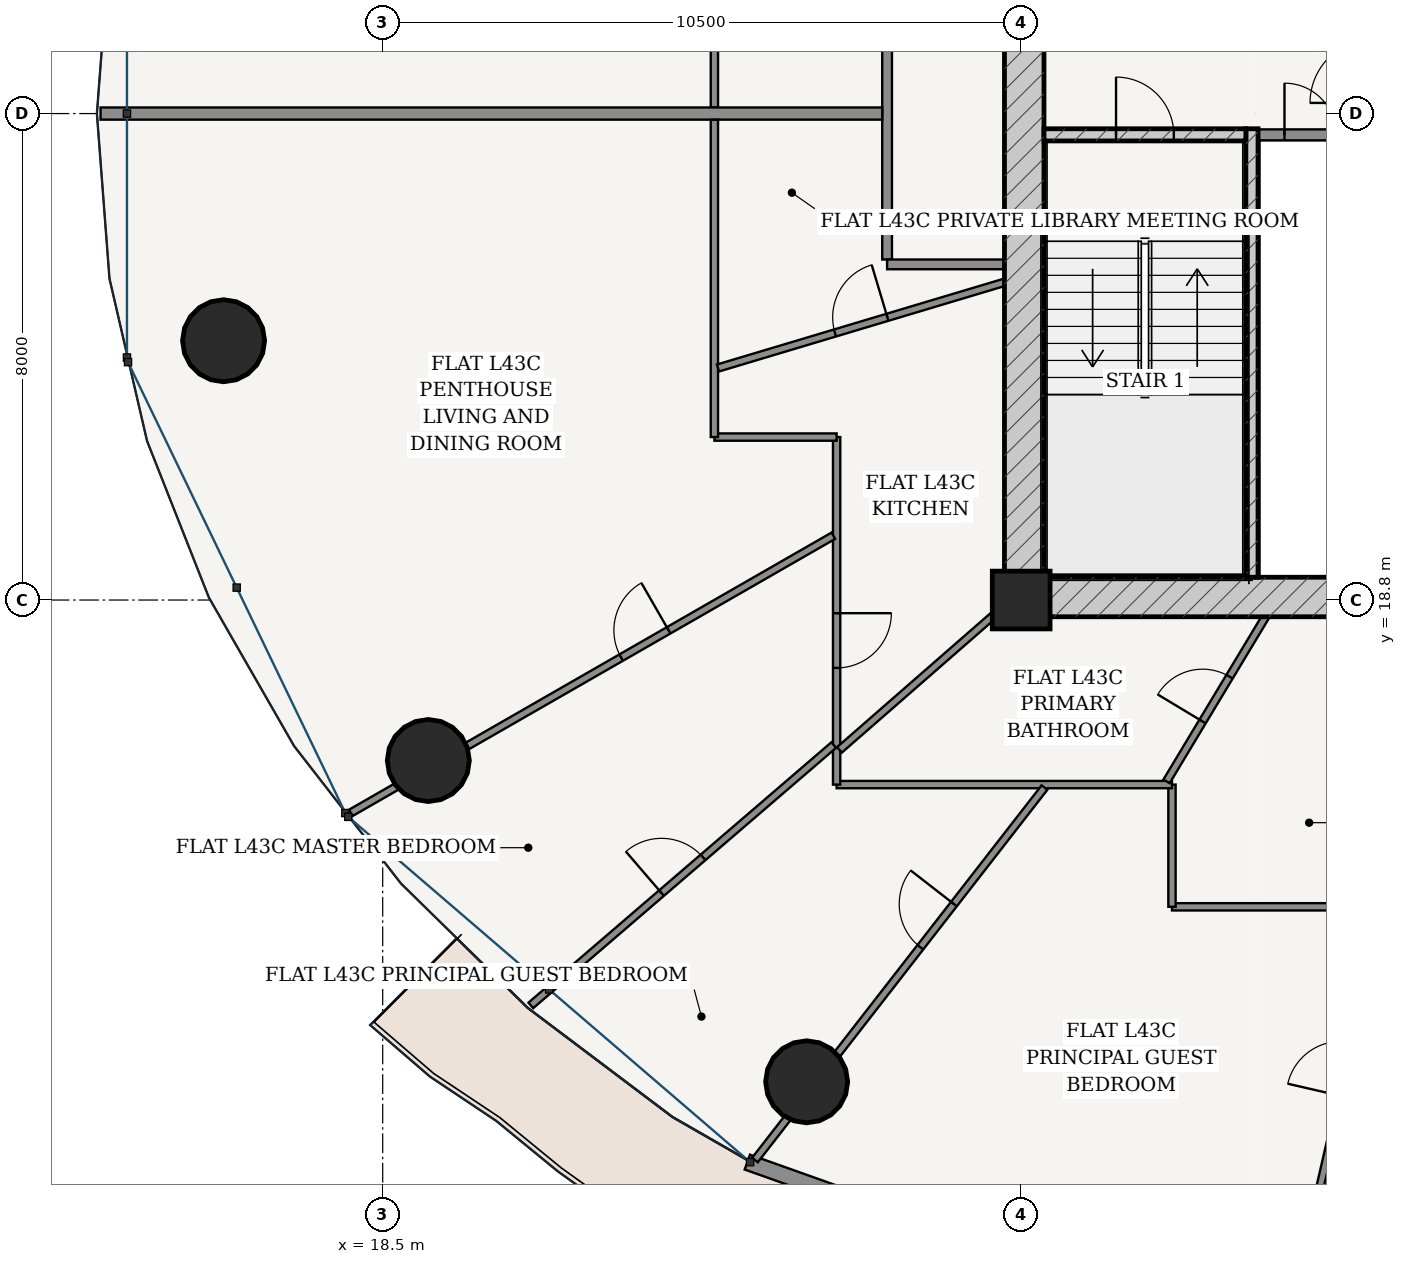
"""IFC4 building model, lengths in metres.
Left out: names, types, materials, properties, quantities, classifications, styles, units other than length and angle.
Written with IfcOpenShell. Run it as: python <this file> out.ifc"""

import sys

from ifc_helpers import new_model, si_unit, direction, frame, frame_2d, origin, origin_2d, place, context, subcontext, project, spatial, rectangle, hollow_circle, extrude, source, transform, mapped, element, fill, save


model = new_model("IFC4")
c1 = context("Model", 3, precision=1e-05, world=origin(), true_north=direction((-0.2419218956, 0.970295726276)))
c2 = subcontext(c1, "Body", "Model", "MODEL_VIEW")
j1 = project(units=[si_unit("LENGTHUNIT", "METRE"), si_unit("PLANEANGLEUNIT", "RADIAN")], contexts=[c1])
p1 = place(None, origin())
s1 = spatial("IfcSite", under=j1, at=p1, CompositionType="ELEMENT")
p2 = place(p1, origin())
s2 = spatial("IfcBuilding", under=s1, at=p2, CompositionType="ELEMENT")
p3 = place(p2, frame((0.0, 0.0, 164.2)))
s3 = spatial("IfcBuildingStorey", under=s2, at=p3, CompositionType="ELEMENT", Elevation=164.2)
p4 = place(p3, frame((29.0, 18.8, 0.0), z_axis=(0.0, 0.0, 1.0), x_axis=(1.0, 0.0, 0.0)))
e1 = element("IfcColumn", 1, at=p4, inside=s3, PredefinedType="COLUMN", context=c2, shape_type="SweptSolid", body=[
    extrude(rectangle(XDim=0.95, YDim=0.95, at=origin_2d()), origin(), (0.0, 0.0, 1.0), 3.6),
])
p5 = place(p3, frame((28.725, 18.85, 0.0), z_axis=(0.0, 0.0, 1.0), x_axis=(1.0, 0.0, 0.0)))
e2 = element("IfcWall", 2, at=p5, inside=s3, PredefinedType="SHEAR", context=c2, shape_type="SweptSolid", body=[
    extrude(rectangle(XDim=18.55, YDim=0.65, at=frame_2d((9.275, 0.0))), origin(), (0.0, 0.0, 1.0), 3.33),
])
p6 = place(p5, frame((8.85, 0.0, 0.0)))
e3 = element("IfcOpeningElement", 3, at=p6, cuts=e2, PredefinedType="OPENING", context=c2, shape_type="SweptSolid", body=[
    extrude(rectangle(XDim=0.85, YDim=2.1, at=frame_2d((0.425, 1.05))), frame((0.0, 0.335, 0.0), z_axis=(0.0, -1.0, 0.0), x_axis=(1.0, 0.0, 0.0)), (0.0, 0.0, 1.0), 0.67),
])
p7 = place(p3, frame((29.05, 19.175, 0.0), z_axis=(0.0, 0.0, 1.0), x_axis=(0.0, 1.0, 0.0)))
e4 = element("IfcWall", 4, at=p7, inside=s3, PredefinedType="SHEAR", context=c2, shape_type="SweptSolid", body=[
    extrude(rectangle(XDim=15.25, YDim=0.65, at=frame_2d((7.625, 0.0))), origin(), (0.0, 0.0, 1.0), 3.33),
])
p8 = place(p7, frame((9.875, 0.0, 0.0)))
e5 = element("IfcOpeningElement", 5, at=p8, cuts=e4, PredefinedType="OPENING", context=c2, shape_type="SweptSolid", body=[
    extrude(rectangle(XDim=1.5, YDim=2.2, at=frame_2d((0.75, 1.1))), frame((0.0, 0.335, 0.0), z_axis=(0.0, -1.0, 0.0), x_axis=(1.0, 0.0, 0.0)), (0.0, 0.0, 1.0), 0.67),
])
p9 = place(p3, frame((32.795, 19.175, 0.0), z_axis=(0.0, 0.0, 1.0), x_axis=(0.0, 1.0, 0.0)))
e6 = element("IfcWall", 6, at=p9, inside=s3, PredefinedType="SOLIDWALL", context=c2, shape_type="SweptSolid", body=[
    extrude(rectangle(XDim=7.375, YDim=0.2, at=frame_2d((3.688, 0.0))), origin(), (0.0, 0.0, 1.0), 3.33),
])
p10 = place(p3, frame((29.375, 26.45, 0.0), z_axis=(0.0, 0.0, 1.0), x_axis=(1.0, 0.0, 0.0)))
e7 = element("IfcWall", 7, at=p10, inside=s3, PredefinedType="SOLIDWALL", context=c2, shape_type="SweptSolid", body=[
    extrude(rectangle(XDim=3.32, YDim=0.2, at=frame_2d((1.66, 0.0))), origin(), (0.0, 0.0, 1.0), 3.33),
])
p11 = place(p10, frame((1.185, 0.0, 0.0)))
e8 = element("IfcOpeningElement", 8, at=p11, cuts=e7, PredefinedType="OPENING", context=c2, shape_type="SweptSolid", body=[
    extrude(rectangle(XDim=0.95, YDim=2.15, at=frame_2d((0.475, 1.075))), frame((0.0, 0.11, 0.0), z_axis=(0.0, -1.0, 0.0), x_axis=(1.0, 0.0, 0.0)), (0.0, 0.0, 1.0), 0.22),
])
for number, where, z_axis, x_axis in (
    (9, (15.883, 23.064, 0.0), (0.0, 0.0, 1.0), (1.0, 0.0, 0.0)),
    (10, (19.25, 16.161, 0.0), (0.0, 0.0, 1.0), (1.0, 0.0, 0.0)),
    (11, (25.472, 10.877, 0.0), (0.0, 0.0, 1.0), (1.0, 0.0, 0.0)),
):
    element("IfcColumn", number, at=place(p3, frame(where, z_axis=z_axis, x_axis=x_axis)), inside=s3, PredefinedType="COLUMN", context=c2, shape_type="SweptSolid", body=[
        extrude(hollow_circle(Radius=0.675, WallThickness=0.042, at=origin_2d()), origin(), (0.0, 0.0, 1.0), 3.6),
    ])
p12 = place(p3, frame((24.497, 9.557, 0.0), z_axis=(0.0, 0.0, 1.0), x_axis=(0.942103604331, -0.335321932934, 0.0)))
e12 = element("IfcWall", 12, at=p12, inside=s3, PredefinedType="SOLIDWALL", context=c2, shape_type="SweptSolid", body=[
    extrude(rectangle(XDim=9.408, YDim=0.26, at=frame_2d((4.704, 0.0))), origin(), (0.0, 0.0, 1.0), 3.33),
])
p13 = place(p12, frame((4.029, 0.0, 0.0)))
e13 = element("IfcOpeningElement", 13, at=p13, cuts=e12, PredefinedType="OPENING", context=c2, shape_type="SweptSolid", body=[
    extrude(rectangle(XDim=1.35, YDim=2.2, at=frame_2d((0.675, 1.1))), frame((0.0, 0.14, 0.0), z_axis=(0.0, -1.0, 0.0), x_axis=(1.0, 0.0, 0.0)), (0.0, 0.0, 1.0), 0.28),
])
p14 = place(p3, frame((32.9, 26.45, 0.0), z_axis=(0.0, 0.0, 1.0), x_axis=(1.0, 0.0, 0.0)))
e14 = element("IfcWall", 14, at=p14, inside=s3, PredefinedType="PARTITIONING", context=c2, shape_type="SweptSolid", body=[
    extrude(rectangle(XDim=1.71, YDim=0.18, at=frame_2d((0.855, 0.0))), origin(), (0.0, 0.0, 1.0), 3.33),
])
p15 = place(p14, frame((0.43, 0.0, 0.0)))
e15 = element("IfcOpeningElement", 15, at=p15, cuts=e14, PredefinedType="OPENING", context=c2, shape_type="SweptSolid", body=[
    extrude(rectangle(XDim=0.85, YDim=2.1, at=frame_2d((0.425, 1.05))), frame((0.0, 0.1, 0.0), z_axis=(0.0, -1.0, 0.0), x_axis=(1.0, 0.0, 0.0)), (0.0, 0.0, 1.0), 0.2),
])
p16 = place(p3, frame((26.795, 24.4, 0.0), z_axis=(0.0, 0.0, 1.0), x_axis=(0.0, 1.0, 0.0)))
e16 = element("IfcWall", 16, at=p16, inside=s3, PredefinedType="PARTITIONING", context=c2, shape_type="SweptSolid", body=[
    extrude(rectangle(XDim=10.675, YDim=0.16, at=frame_2d((5.337, 0.0))), origin(), (0.0, 0.0, 1.0), 2.776),
])
p17 = place(p16, frame((8.422, 0.0, 0.0)))
e17 = element("IfcOpeningElement", 17, at=p17, cuts=e16, PredefinedType="OPENING", context=c2, shape_type="SweptSolid", body=[
    extrude(rectangle(XDim=0.98, YDim=2.2, at=frame_2d((0.49, 1.1))), frame((0.0, 0.09, 0.0), z_axis=(0.0, -1.0, 0.0), x_axis=(1.0, 0.0, 0.0)), (0.0, 0.0, 1.0), 0.18),
])
p18 = place(p3, frame((26.795, 24.32, 0.0), z_axis=(0.0, 0.0, 1.0), x_axis=(1.0, 0.0, 0.0)))
e18 = element("IfcWall", 18, at=p18, inside=s3, PredefinedType="PARTITIONING", context=c2, shape_type="SweptSolid", body=[
    extrude(rectangle(XDim=1.93, YDim=0.16, at=frame_2d((0.965, 0.0))), origin(), (0.0, 0.0, 1.0), 3.33),
])
p19 = place(p3, frame((23.955, 26.902, 0.0), z_axis=(0.0, 0.0, 1.0), x_axis=(0.0, 1.0, 0.0)))
e19 = element("IfcWall", 19, at=p19, inside=s3, PredefinedType="PARTITIONING", context=c2, shape_type="SweptSolid", body=[
    extrude(rectangle(XDim=11.093, YDim=0.12, at=frame_2d((5.546, 0.0))), origin(), (0.0, 0.0, 1.0), 2.776),
])
p20 = place(p19, frame((7.997, 0.0, 0.0)))
e20 = element("IfcOpeningElement", 20, at=p20, cuts=e19, PredefinedType="OPENING", context=c2, shape_type="SweptSolid", body=[
    extrude(rectangle(XDim=0.9, YDim=2.15, at=frame_2d((0.45, 1.075))), frame((0.0, 0.07, 0.0), z_axis=(0.0, -1.0, 0.0), x_axis=(1.0, 0.0, 0.0)), (0.0, 0.0, 1.0), 0.14),
])
p21 = place(p3, frame((26.715, 26.8, 0.0), z_axis=(0.0, 0.0, 1.0), x_axis=(-1.0, 0.0, 0.0)))
e21 = element("IfcWall", 21, at=p21, inside=s3, PredefinedType="PARTITIONING", context=c2, shape_type="SweptSolid", body=[
    extrude(rectangle(XDim=12.855, YDim=0.2, at=frame_2d((6.427, 0.0))), origin(), (0.0, 0.0, 1.0), 2.846),
])
p22 = place(p3, frame((37.898, 13.755, 0.0), z_axis=(0.0, 0.0, 1.0), x_axis=(-1.0, 0.0, 0.0)))
e22 = element("IfcWall", 22, at=p22, inside=s3, PredefinedType="PARTITIONING", context=c2, shape_type="SweptSolid", body=[
    extrude(rectangle(XDim=6.418, YDim=0.12, at=frame_2d((3.209, 0.0))), origin(), (0.0, 0.0, 1.0), 2.776),
])
p23 = place(p22, frame((1.132, 0.0, 0.0)))
e23 = element("IfcOpeningElement", 23, at=p23, cuts=e22, PredefinedType="OPENING", context=c2, shape_type="SweptSolid", body=[
    extrude(rectangle(XDim=0.9, YDim=2.15, at=frame_2d((0.45, 1.075))), frame((0.0, 0.07, 0.0), z_axis=(0.0, -1.0, 0.0), x_axis=(1.0, 0.0, 0.0)), (0.0, 0.0, 1.0), 0.14),
])
p24 = place(p3, frame((31.48, 13.755, 0.0), z_axis=(0.0, 0.0, 1.0), x_axis=(0.0, 1.0, 0.0)))
e24 = element("IfcWall", 24, at=p24, inside=s3, PredefinedType="PARTITIONING", context=c2, shape_type="SweptSolid", body=[
    extrude(rectangle(XDim=2.01, YDim=0.12, at=frame_2d((1.005, 0.0))), origin(), (0.0, 0.0, 1.0), 3.005),
])
p25 = place(p3, frame((31.48, 15.765, 0.0), z_axis=(0.0, 0.0, 1.0), x_axis=(-1.0, 0.0, 0.0)))
e25 = element("IfcWall", 25, at=p25, inside=s3, PredefinedType="PARTITIONING", context=c2, shape_type="SweptSolid", body=[
    extrude(rectangle(XDim=5.515, YDim=0.12, at=frame_2d((2.757, 0.0))), origin(), (0.0, 0.0, 1.0), 2.776),
])
p26 = place(p3, frame((25.965, 15.765, 0.0), z_axis=(0.0, 0.0, 1.0), x_axis=(0.0, 1.0, 0.0)))
e26 = element("IfcWall", 26, at=p26, inside=s3, PredefinedType="PARTITIONING", context=c2, shape_type="SweptSolid", body=[
    extrude(rectangle(XDim=5.715, YDim=0.12, at=frame_2d((2.857, 0.0))), origin(), (0.0, 0.0, 1.0), 2.776),
])
p27 = place(p26, frame((1.919, 0.0, 0.0)))
e27 = element("IfcOpeningElement", 27, at=p27, cuts=e26, PredefinedType="OPENING", context=c2, shape_type="SweptSolid", body=[
    extrude(rectangle(XDim=0.9, YDim=2.15, at=frame_2d((0.45, 1.075))), frame((0.0, 0.07, 0.0), z_axis=(0.0, -1.0, 0.0), x_axis=(1.0, 0.0, 0.0)), (0.0, 0.0, 1.0), 0.14),
])
p28 = place(p3, frame((25.965, 21.48, 0.0), z_axis=(0.0, 0.0, 1.0), x_axis=(-1.0, 0.0, 0.0)))
e28 = element("IfcWall", 28, at=p28, inside=s3, PredefinedType="PARTITIONING", context=c2, shape_type="SweptSolid", body=[
    extrude(rectangle(XDim=2.01, YDim=0.12, at=frame_2d((1.005, 0.0))), origin(), (0.0, 0.0, 1.0), 3.33),
])
p29 = place(p3, frame((23.955, 21.48, 0.0), z_axis=(0.0, 0.0, 1.0), x_axis=(0.0, 1.0, 0.0)))
e29 = element("IfcWall", 29, at=p29, inside=s3, PredefinedType="PARTITIONING", context=c2, shape_type="SweptSolid", body=[
    extrude(rectangle(XDim=5.218, YDim=0.12, at=frame_2d((2.609, 0.0))), origin(), (0.0, 0.0, 1.0), 2.776),
])
p30 = place(p3, frame((25.911, 19.857, 0.0), z_axis=(0.0, 0.0, 1.0), x_axis=(-0.867160939672, -0.498028015986, 0.0)))
e30 = element("IfcWall", 30, at=p30, inside=s3, PredefinedType="PARTITIONING", context=c2, shape_type="SweptSolid", body=[
    extrude(rectangle(XDim=9.152, YDim=0.12, at=frame_2d((4.576, 0.0))), origin(), (0.0, 0.0, 1.0), 2.776),
])
p31 = place(p30, frame((3.124, 0.0, 0.0)))
e31 = element("IfcOpeningElement", 31, at=p31, cuts=e30, PredefinedType="OPENING", context=c2, shape_type="SweptSolid", body=[
    extrude(rectangle(XDim=0.9, YDim=2.15, at=frame_2d((0.45, 1.075))), frame((0.0, 0.07, 0.0), z_axis=(0.0, -1.0, 0.0), x_axis=(1.0, 0.0, 0.0)), (0.0, 0.0, 1.0), 0.14),
])
p32 = place(p3, frame((25.918, 16.416, 0.0), z_axis=(0.0, 0.0, 1.0), x_axis=(-0.758356041353, -0.651840559142, 0.0)))
e32 = element("IfcWall", 32, at=p32, inside=s3, PredefinedType="PARTITIONING", context=c2, shape_type="SweptSolid", body=[
    extrude(rectangle(XDim=6.569, YDim=0.12, at=frame_2d((3.285, 0.0))), origin(), (0.0, 0.0, 1.0), 2.846),
])
p33 = place(p32, frame((2.834, 0.0, 0.0)))
e33 = element("IfcOpeningElement", 33, at=p33, cuts=e32, PredefinedType="OPENING", context=c2, shape_type="SweptSolid", body=[
    extrude(rectangle(XDim=0.9, YDim=2.15, at=frame_2d((0.45, 1.075))), frame((0.0, 0.07, 0.0), z_axis=(0.0, -1.0, 0.0), x_axis=(1.0, 0.0, 0.0)), (0.0, 0.0, 1.0), 0.14),
])
p34 = place(p3, frame((29.383, 15.716, 0.0), z_axis=(0.0, 0.0, 1.0), x_axis=(-0.613751061882, -0.789499609904, 0.0)))
e34 = element("IfcWall", 34, at=p34, inside=s3, PredefinedType="PARTITIONING", context=c2, shape_type="SweptSolid", body=[
    extrude(rectangle(XDim=7.758, YDim=0.12, at=frame_2d((3.879, 0.0))), origin(), (0.0, 0.0, 1.0), 2.776),
])
p35 = place(p34, frame((2.426, 0.0, 0.0)))
e35 = element("IfcOpeningElement", 35, at=p35, cuts=e34, PredefinedType="OPENING", context=c2, shape_type="SweptSolid", body=[
    extrude(rectangle(XDim=0.9, YDim=2.15, at=frame_2d((0.45, 1.075))), frame((0.0, 0.07, 0.0), z_axis=(0.0, -1.0, 0.0), x_axis=(1.0, 0.0, 0.0)), (0.0, 0.0, 1.0), 0.14),
])
p36 = place(p3, frame((34.967, 13.695, 0.0), z_axis=(0.0, 0.0, 1.0), x_axis=(-0.225458405801, -0.974252794327, 0.0)))
e36 = element("IfcWall", 36, at=p36, inside=s3, PredefinedType="PARTITIONING", context=c2, shape_type="SweptSolid", body=[
    extrude(rectangle(XDim=7.383, YDim=0.12, at=frame_2d((3.691, 0.0))), origin(), (0.0, 0.0, 1.0), 2.776),
])
p37 = place(p36, frame((2.232, 0.0, 0.0)))
e37 = element("IfcOpeningElement", 37, at=p37, cuts=e36, PredefinedType="OPENING", context=c2, shape_type="SweptSolid", body=[
    extrude(rectangle(XDim=0.9, YDim=2.15, at=frame_2d((0.45, 1.075))), frame((0.0, 0.07, 0.0), z_axis=(0.0, -1.0, 0.0), x_axis=(1.0, 0.0, 0.0)), (0.0, 0.0, 1.0), 0.14),
])
p38 = place(p3, frame((28.723, 24.025, 0.0), z_axis=(0.0, 0.0, 1.0), x_axis=(-0.958046115523, -0.286614096882, 0.0)))
e38 = element("IfcWall", 38, at=p38, inside=s3, PredefinedType="PARTITIONING", context=c2, shape_type="SweptSolid", body=[
    extrude(rectangle(XDim=4.915, YDim=0.12, at=frame_2d((2.458, 0.0))), origin(), (0.0, 0.0, 1.0), 3.33),
])
p39 = place(p38, frame((2.007, 0.0, 0.0)))
e39 = element("IfcOpeningElement", 39, at=p39, cuts=e38, PredefinedType="OPENING", context=c2, shape_type="SweptSolid", body=[
    extrude(rectangle(XDim=0.9, YDim=2.15, at=frame_2d((0.45, 1.075))), frame((0.0, 0.07, 0.0), z_axis=(0.0, -1.0, 0.0), x_axis=(1.0, 0.0, 0.0)), (0.0, 0.0, 1.0), 0.14),
])
p40 = place(p3, frame((28.588, 18.585, 0.0), z_axis=(0.0, 0.0, 1.0), x_axis=(-0.753380933673, -0.657584343471, 0.0)))
e40 = element("IfcWall", 40, at=p40, inside=s3, PredefinedType="PARTITIONING", context=c2, shape_type="SweptSolid", body=[
    extrude(rectangle(XDim=3.42, YDim=0.12, at=frame_2d((1.71, 0.0))), origin(), (0.0, 0.0, 1.0), 3.005),
])
p41 = place(p3, frame((33.02, 18.525, 0.0), z_axis=(0.0, 0.0, 1.0), x_axis=(-0.515677168, -0.856782970421, 0.0)))
e41 = element("IfcWall", 41, at=p41, inside=s3, PredefinedType="PARTITIONING", context=c2, shape_type="SweptSolid", body=[
    extrude(rectangle(XDim=3.159, YDim=0.12, at=frame_2d((1.58, 0.0))), origin(), (0.0, 0.0, 1.0), 3.33),
])
p42 = place(p41, frame((1.15, 0.0, 0.0)))
e42 = element("IfcOpeningElement", 42, at=p42, cuts=e41, PredefinedType="OPENING", context=c2, shape_type="SweptSolid", body=[
    extrude(rectangle(XDim=0.86, YDim=2.15, at=frame_2d((0.43, 1.075))), frame((0.0, 0.07, 0.0), z_axis=(0.0, -1.0, 0.0), x_axis=(1.0, 0.0, 0.0)), (0.0, 0.0, 1.0), 0.14),
])
m1 = source(origin(), c2, "Body", "SweptSolid", [
    extrude(rectangle(XDim=0.95, YDim=2.15, at=frame_2d((0.475, 1.075))), frame((0.0, 0.025, 0.0), z_axis=(0.0, -1.0, 0.0), x_axis=(1.0, 0.0, 0.0)), (0.0, 0.0, 1.0), 0.05),
])
p43 = place(p11, origin())
e43 = element("IfcDoor", 43, at=p43, inside=s3, OperationType="SINGLE_SWING_LEFT", PredefinedType="DOOR", context=c2, shape_type="MappedRepresentation", body=[
    mapped(m1, transform((0.0, 0.0, 0.0), scale=1.0)),
])
fill(e8, e43)
m2 = source(origin(), c2, "Body", "SweptSolid", [
    extrude(rectangle(XDim=0.85, YDim=2.1, at=frame_2d((0.425, 1.05))), frame((0.0, 0.025, 0.0), z_axis=(0.0, -1.0, 0.0), x_axis=(1.0, 0.0, 0.0)), (0.0, 0.0, 1.0), 0.05),
])
p44 = place(p15, origin())
e44 = element("IfcDoor", 44, at=p44, inside=s3, OperationType="SINGLE_SWING_LEFT", PredefinedType="DOOR", context=c2, shape_type="MappedRepresentation", body=[
    mapped(m2, transform((0.0, 0.0, 0.0), scale=1.0)),
])
fill(e15, e44)
m3 = source(origin(), c2, "Body", "SweptSolid", [
    extrude(rectangle(XDim=0.86, YDim=2.15, at=frame_2d((0.43, 1.075))), frame((0.0, 0.025, 0.0), z_axis=(0.0, -1.0, 0.0), x_axis=(1.0, 0.0, 0.0)), (0.0, 0.0, 1.0), 0.05),
])
p45 = place(p42, frame((0.86, 0.0, 0.0), z_axis=(0.0, 0.0, 1.0), x_axis=(-1.0, 0.0, 0.0)))
e45 = element("IfcDoor", 45, at=p45, inside=s3, OperationType="SINGLE_SWING_LEFT", PredefinedType="DOOR", context=c2, shape_type="MappedRepresentation", body=[
    mapped(m3, transform((0.0, 0.0, 0.0), scale=1.0)),
])
fill(e42, e45)
m4 = source(origin(), c2, "Body", "SweptSolid", [
    extrude(rectangle(XDim=0.9, YDim=2.15, at=frame_2d((0.45, 1.075))), frame((0.0, 0.025, 0.0), z_axis=(0.0, -1.0, 0.0), x_axis=(1.0, 0.0, 0.0)), (0.0, 0.0, 1.0), 0.05),
])
p46 = place(p35, frame((0.9, 0.0, 0.0), z_axis=(0.0, 0.0, 1.0), x_axis=(-1.0, 0.0, 0.0)))
e46 = element("IfcDoor", 46, at=p46, inside=s3, OperationType="SINGLE_SWING_RIGHT", PredefinedType="DOOR", context=c2, shape_type="MappedRepresentation", body=[
    mapped(m4, transform((0.0, 0.0, 0.0), scale=1.0)),
])
fill(e35, e46)
p47 = place(p33, frame((0.9, 0.0, 0.0), z_axis=(0.0, 0.0, 1.0), x_axis=(-1.0, 0.0, 0.0)))
e47 = element("IfcDoor", 47, at=p47, inside=s3, OperationType="SINGLE_SWING_LEFT", PredefinedType="DOOR", context=c2, shape_type="MappedRepresentation", body=[
    mapped(m4, transform((0.0, 0.0, 0.0), scale=1.0)),
])
fill(e33, e47)
p48 = place(p31, frame((0.9, 0.0, 0.0), z_axis=(0.0, 0.0, 1.0), x_axis=(-1.0, 0.0, 0.0)))
e48 = element("IfcDoor", 48, at=p48, inside=s3, OperationType="SINGLE_SWING_RIGHT", PredefinedType="DOOR", context=c2, shape_type="MappedRepresentation", body=[
    mapped(m4, transform((0.0, 0.0, 0.0), scale=1.0)),
])
fill(e31, e48)
p49 = place(p27, frame((0.9, 0.0, 0.0), z_axis=(0.0, 0.0, 1.0), x_axis=(-1.0, 0.0, 0.0)))
e49 = element("IfcDoor", 49, at=p49, inside=s3, OperationType="SINGLE_SWING_LEFT", PredefinedType="DOOR", context=c2, shape_type="MappedRepresentation", body=[
    mapped(m4, transform((0.0, 0.0, 0.0), scale=1.0)),
])
fill(e27, e49)
p50 = place(p39, frame((0.9, 0.0, 0.0), z_axis=(0.0, 0.0, 1.0), x_axis=(-1.0, 0.0, 0.0)))
e50 = element("IfcDoor", 50, at=p50, inside=s3, OperationType="SINGLE_SWING_RIGHT", PredefinedType="DOOR", context=c2, shape_type="MappedRepresentation", body=[
    mapped(m4, transform((0.0, 0.0, 0.0), scale=1.0)),
])
fill(e39, e50)
save(model, sys.argv[1])
